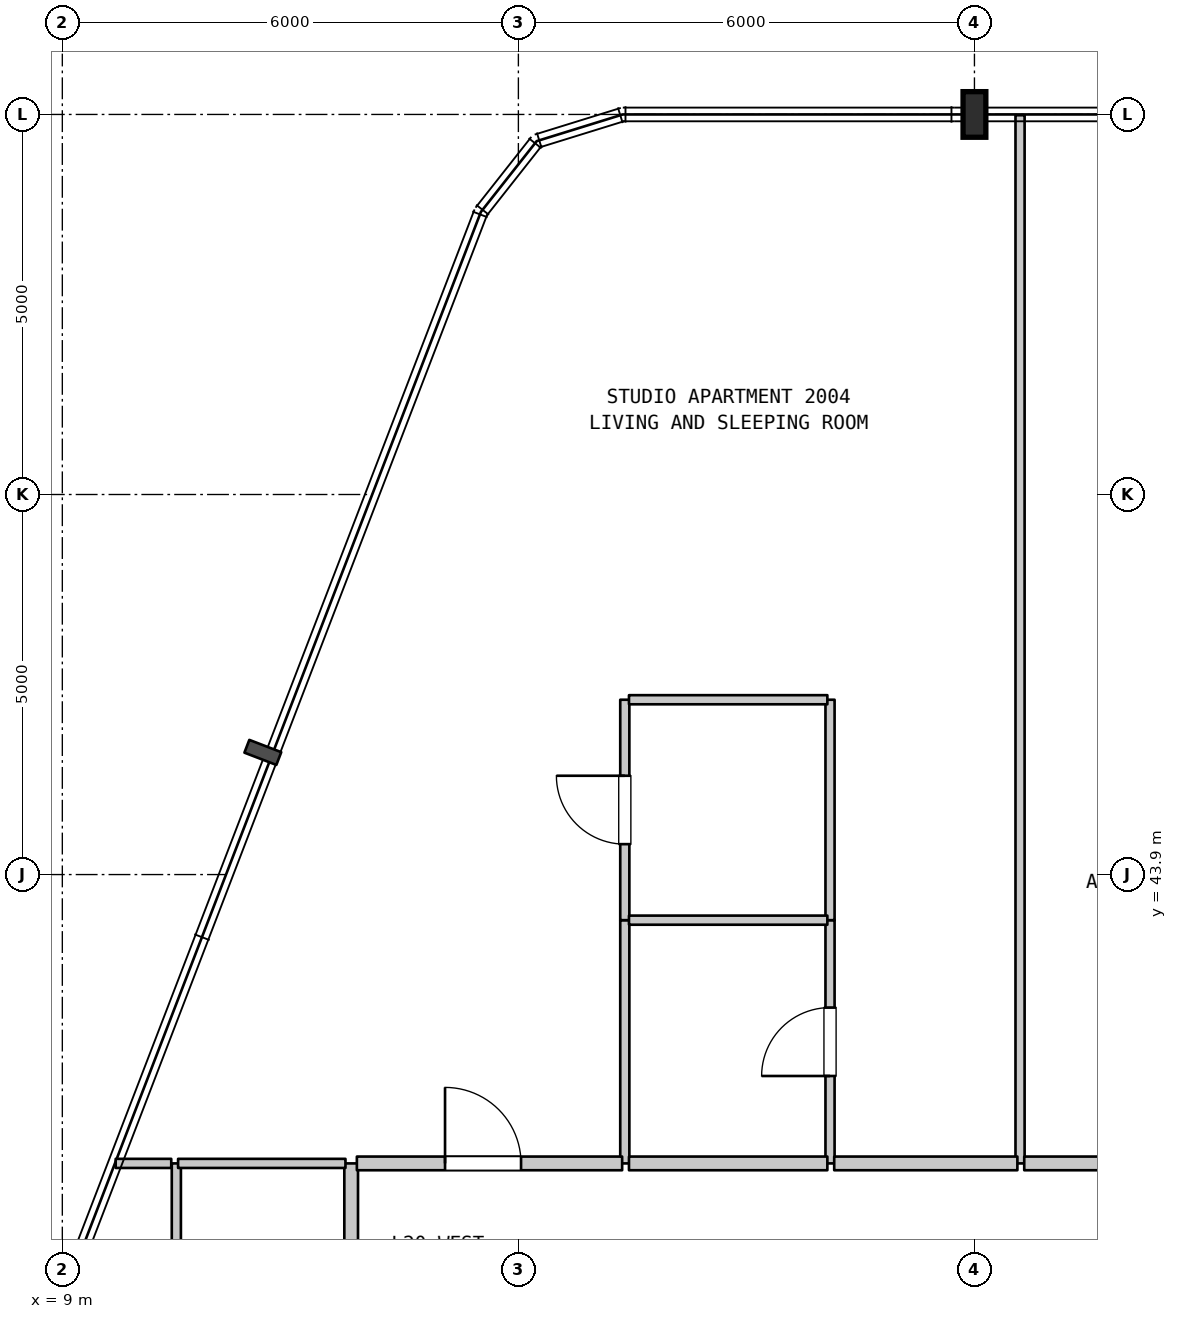
"""IFC4 building model, lengths in metres.
Left out: names, types, materials, properties, quantities, classifications, styles, units other than length and angle.
Written with IfcOpenShell. Run it as: python <this file> out.ifc"""

import sys

from ifc_helpers import new_model, si_unit, direction, frame, frame_2d, origin, origin_2d, place, context, subcontext, project, spatial, rectangle, i_section, extrude, element, fill, save


model = new_model("IFC4")
c1 = context("Model", 3, precision=1e-05, world=origin(), true_north=direction((0.0, 1.0)))
c2 = subcontext(c1, "Body", "Model", "MODEL_VIEW")
j1 = project(units=[si_unit("LENGTHUNIT", "METRE"), si_unit("PLANEANGLEUNIT", "RADIAN")], contexts=[c1])
p1 = place(None, origin())
s1 = spatial("IfcSite", under=j1, at=p1, CompositionType="ELEMENT")
p2 = place(p1, origin())
s2 = spatial("IfcBuilding", under=s1, at=p2, CompositionType="ELEMENT")
p3 = place(p2, frame((0.0, 0.0, 86.4)))
s3 = spatial("IfcBuildingStorey", under=s2, at=p3, CompositionType="ELEMENT", Elevation=86.4)
p4 = place(p3, frame((21.0, 53.9, 0.0), z_axis=(0.0, 0.0, 1.0), x_axis=(1.0, 0.0, 0.0)))
e1 = element("IfcColumn", 1, at=p4, inside=s3, PredefinedType="COLUMN", context=c2, shape_type="SweptSolid", body=[
    extrude(i_section(OverallWidth=0.3, OverallDepth=0.6, WebThickness=0.015, FlangeThickness=0.03, FilletRadius=0.027, at=origin_2d()), origin(), (0.0, 0.0, 1.0), 4.5),
])
p5 = place(p3, frame((10.5, 31.45, 0.0), z_axis=(0.0, 0.0, 1.0), x_axis=(0.0, 1.0, 0.0)))
e2 = element("IfcWall", 2, at=p5, inside=s3, PredefinedType="PARTITIONING", context=c2, shape_type="SweptSolid", body=[
    extrude(rectangle(XDim=8.65, YDim=0.12, at=frame_2d((4.325, 0.0))), origin(), (0.0, 0.0, 1.0), 4.185),
])
p6 = place(p3, frame((12.8, 31.45, 0.0), z_axis=(0.0, 0.0, 1.0), x_axis=(0.0, 1.0, 0.0)))
e3 = element("IfcWall", 3, at=p6, inside=s3, PredefinedType="STANDARD", context=c2, shape_type="SweptSolid", body=[
    extrude(rectangle(XDim=8.65, YDim=0.18, at=frame_2d((4.325, 0.0))), origin(), (0.0, 0.0, 1.0), 4.185),
])
p7 = place(p3, frame((16.4, 40.1, 0.0), z_axis=(0.0, 0.0, 1.0), x_axis=(0.0, 1.0, 0.0)))
e4 = element("IfcWall", 4, at=p7, inside=s3, PredefinedType="PARTITIONING", context=c2, shape_type="SweptSolid", body=[
    extrude(rectangle(XDim=3.2, YDim=0.12, at=frame_2d((1.6, 0.0))), origin(), (0.0, 0.0, 1.0), 4.185),
])
p8 = place(p3, frame((16.4, 43.3, 0.0), z_axis=(0.0, 0.0, 1.0), x_axis=(0.0, 1.0, 0.0)))
e5 = element("IfcWall", 5, at=p8, inside=s3, PredefinedType="PARTITIONING", context=c2, shape_type="SweptSolid", body=[
    extrude(rectangle(XDim=2.9, YDim=0.12, at=frame_2d((1.45, 0.0))), origin(), (0.0, 0.0, 1.0), 4.185),
])
p9 = place(p8, frame((1.0, 0.0, 0.0)))
e6 = element("IfcOpeningElement", 6, at=p9, cuts=e5, PredefinedType="OPENING", context=c2, shape_type="SweptSolid", body=[
    extrude(rectangle(XDim=0.9, YDim=2.1, at=frame_2d((0.45, 1.05))), frame((0.0, 0.07, 0.0), z_axis=(0.0, -1.0, 0.0), x_axis=(1.0, 0.0, 0.0)), (0.0, 0.0, 1.0), 0.14),
])
p10 = place(p3, frame((19.1, 40.1, 0.0), z_axis=(0.0, 0.0, 1.0), x_axis=(0.0, 1.0, 0.0)))
e7 = element("IfcWall", 7, at=p10, inside=s3, PredefinedType="PARTITIONING", context=c2, shape_type="SweptSolid", body=[
    extrude(rectangle(XDim=3.2, YDim=0.12, at=frame_2d((1.6, 0.0))), origin(), (0.0, 0.0, 1.0), 4.185),
])
p11 = place(p10, frame((1.15, 0.0, 0.0)))
e8 = element("IfcOpeningElement", 8, at=p11, cuts=e7, PredefinedType="OPENING", context=c2, shape_type="SweptSolid", body=[
    extrude(rectangle(XDim=0.9, YDim=2.15, at=frame_2d((0.45, 1.075))), frame((0.0, 0.07, 0.0), z_axis=(0.0, -1.0, 0.0), x_axis=(1.0, 0.0, 0.0)), (0.0, 0.0, 1.0), 0.14),
])
p12 = place(p3, frame((19.1, 43.3, 0.0), z_axis=(0.0, 0.0, 1.0), x_axis=(0.0, 1.0, 0.0)))
e9 = element("IfcWall", 9, at=p12, inside=s3, PredefinedType="PARTITIONING", context=c2, shape_type="SweptSolid", body=[
    extrude(rectangle(XDim=2.9, YDim=0.12, at=frame_2d((1.45, 0.0))), origin(), (0.0, 0.0, 1.0), 4.185),
])
p13 = place(p3, frame((21.6, 40.1, 0.0), z_axis=(0.0, 0.0, 1.0), x_axis=(0.0, 1.0, 0.0)))
e10 = element("IfcWall", 10, at=p13, inside=s3, PredefinedType="PARTITIONING", context=c2, shape_type="SweptSolid", body=[
    extrude(rectangle(XDim=13.79, YDim=0.12, at=frame_2d((6.895, 0.0))), origin(), (0.0, 0.0, 1.0), 4.185),
])
p14 = place(p3, frame((9.702, 40.1, 0.0), z_axis=(0.0, 0.0, 1.0), x_axis=(1.0, 0.0, 0.0)))
e11 = element("IfcWall", 11, at=p14, inside=s3, PredefinedType="PARTITIONING", context=c2, shape_type="SweptSolid", body=[
    extrude(rectangle(XDim=0.731, YDim=0.12, at=frame_2d((0.366, 0.0))), origin(), (0.0, 0.0, 1.0), 4.185),
])
p15 = place(p3, frame((10.523, 40.1, 0.0), z_axis=(0.0, 0.0, 1.0), x_axis=(1.0, 0.0, 0.0)))
e12 = element("IfcWall", 12, at=p15, inside=s3, PredefinedType="PARTITIONING", context=c2, shape_type="SweptSolid", body=[
    extrude(rectangle(XDim=2.202, YDim=0.12, at=frame_2d((1.101, 0.0))), origin(), (0.0, 0.0, 1.0), 4.185),
])
p16 = place(p3, frame((12.875, 40.1, 0.0), z_axis=(0.0, 0.0, 1.0), x_axis=(1.0, 0.0, 0.0)))
e13 = element("IfcWall", 13, at=p16, inside=s3, PredefinedType="STANDARD", context=c2, shape_type="SweptSolid", body=[
    extrude(rectangle(XDim=3.49, YDim=0.18, at=frame_2d((1.745, 0.0))), origin(), (0.0, 0.0, 1.0), 4.185),
])
p17 = place(p16, frame((1.16, 0.0, 0.0)))
e14 = element("IfcOpeningElement", 14, at=p17, cuts=e13, PredefinedType="OPENING", context=c2, shape_type="SweptSolid", body=[
    extrude(rectangle(XDim=1.0, YDim=2.15, at=frame_2d((0.5, 1.075))), frame((0.0, 0.1, 0.0), z_axis=(0.0, -1.0, 0.0), x_axis=(1.0, 0.0, 0.0)), (0.0, 0.0, 1.0), 0.2),
])
p18 = place(p3, frame((16.455, 40.1, 0.0), z_axis=(0.0, 0.0, 1.0), x_axis=(1.0, 0.0, 0.0)))
e15 = element("IfcWall", 15, at=p18, inside=s3, PredefinedType="STANDARD", context=c2, shape_type="SweptSolid", body=[
    extrude(rectangle(XDim=2.61, YDim=0.18, at=frame_2d((1.305, 0.0))), origin(), (0.0, 0.0, 1.0), 4.185),
])
p19 = place(p3, frame((19.155, 40.1, 0.0), z_axis=(0.0, 0.0, 1.0), x_axis=(1.0, 0.0, 0.0)))
e16 = element("IfcWall", 16, at=p19, inside=s3, PredefinedType="STANDARD", context=c2, shape_type="SweptSolid", body=[
    extrude(rectangle(XDim=2.41, YDim=0.18, at=frame_2d((1.205, 0.0))), origin(), (0.0, 0.0, 1.0), 4.185),
])
p20 = place(p3, frame((21.655, 40.1, 0.0), z_axis=(0.0, 0.0, 1.0), x_axis=(1.0, 0.0, 0.0)))
e17 = element("IfcWall", 17, at=p20, inside=s3, PredefinedType="STANDARD", context=c2, shape_type="SweptSolid", body=[
    extrude(rectangle(XDim=4.51, YDim=0.18, at=frame_2d((2.255, 0.0))), origin(), (0.0, 0.0, 1.0), 4.185),
])
p21 = place(p20, frame((1.755, 0.0, 0.0)))
e18 = element("IfcOpeningElement", 18, at=p21, cuts=e17, PredefinedType="OPENING", context=c2, shape_type="SweptSolid", body=[
    extrude(rectangle(XDim=1.0, YDim=2.15, at=frame_2d((0.5, 1.075))), frame((0.0, 0.1, 0.0), z_axis=(0.0, -1.0, 0.0), x_axis=(1.0, 0.0, 0.0)), (0.0, 0.0, 1.0), 0.2),
])
for number, where, z_axis, x_axis in (
    (19, (16.455, 43.3, 0.0), (0.0, 0.0, 1.0), (1.0, 0.0, 0.0)),
    (20, (16.455, 46.2, 0.0), (0.0, 0.0, 1.0), (1.0, 0.0, 0.0)),
):
    element("IfcWall", number, at=place(p3, frame(where, z_axis=z_axis, x_axis=x_axis)), inside=s3, PredefinedType="PARTITIONING", context=c2, shape_type="SweptSolid", body=[
        extrude(rectangle(XDim=2.61, YDim=0.12, at=frame_2d((1.305, 0.0))), origin(), (0.0, 0.0, 1.0), 4.185),
    ])
p22 = place(p9, origin())
e21 = element("IfcDoor", 21, at=p22, inside=s3, OperationType="SINGLE_SWING_RIGHT", PredefinedType="DOOR", context=c2, shape_type="SweptSolid", body=[
    extrude(rectangle(XDim=0.9, YDim=2.1, at=frame_2d((0.45, 1.05))), frame((0.0, 0.025, 0.0), z_axis=(0.0, -1.0, 0.0), x_axis=(1.0, 0.0, 0.0)), (0.0, 0.0, 1.0), 0.05),
])
fill(e6, e21)
p23 = place(p11, origin())
e22 = element("IfcDoor", 22, at=p23, inside=s3, OperationType="SINGLE_SWING_LEFT", PredefinedType="DOOR", context=c2, shape_type="SweptSolid", body=[
    extrude(rectangle(XDim=0.9, YDim=2.15, at=frame_2d((0.45, 1.075))), frame((0.0, 0.025, 0.0), z_axis=(0.0, -1.0, 0.0), x_axis=(1.0, 0.0, 0.0)), (0.0, 0.0, 1.0), 0.05),
])
fill(e8, e22)
p24 = place(p17, origin())
e23 = element("IfcDoor", 23, at=p24, inside=s3, OperationType="SINGLE_SWING_LEFT", PredefinedType="DOOR", context=c2, shape_type="SweptSolid", body=[
    extrude(rectangle(XDim=1.0, YDim=2.15, at=frame_2d((0.5, 1.075))), frame((0.0, 0.025, 0.0), z_axis=(0.0, -1.0, 0.0), x_axis=(1.0, 0.0, 0.0)), (0.0, 0.0, 1.0), 0.05),
])
fill(e14, e23)
save(model, sys.argv[1])
